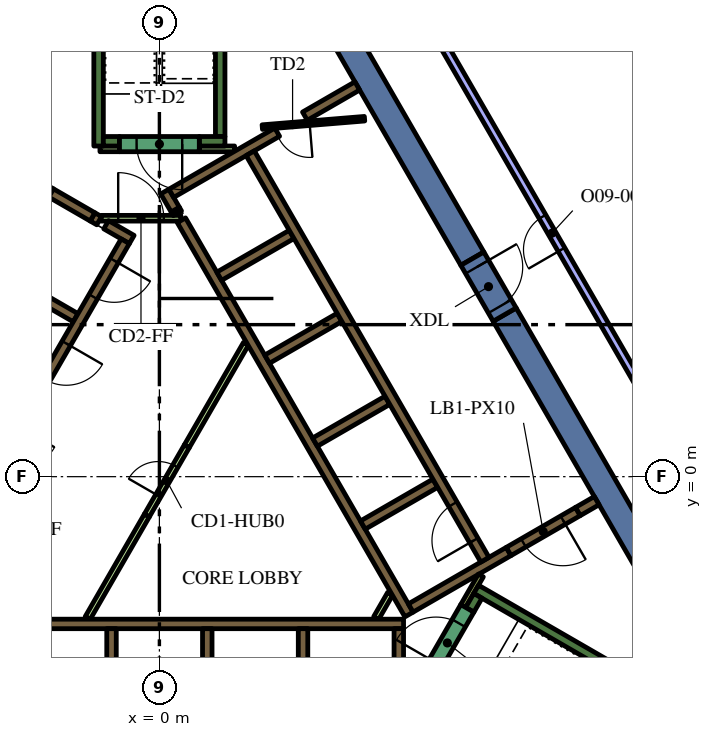
"""IFC4 building model, lengths in metres.
Left out: names, types, materials, properties, quantities, classifications, styles, units other than length and angle.
Written with IfcOpenShell. Run it as: python <this file> out.ifc"""

import sys

from ifc_helpers import new_model, si_unit, direction, frame, frame_2d, origin, place, context, subcontext, project, spatial, rectangle, extrude, element, fill, save


model = new_model("IFC4")
c1 = context("Model", 3, precision=1e-05, world=origin(), true_north=direction((0.0, 1.0)))
c2 = subcontext(c1, "Body", "Model", "MODEL_VIEW")
j1 = project(units=[si_unit("LENGTHUNIT", "METRE"), si_unit("PLANEANGLEUNIT", "RADIAN")], contexts=[c1])
p1 = place(None, origin())
s1 = spatial("IfcSite", under=j1, at=p1, CompositionType="ELEMENT")
p2 = place(p1, origin())
s2 = spatial("IfcBuilding", under=s1, at=p2, CompositionType="ELEMENT")
p3 = place(p2, frame((0.0, 0.0, 239.4)))
s3 = spatial("IfcBuildingStorey", under=s2, at=p3, CompositionType="ELEMENT", Elevation=239.4)
for number, where, z_axis, x_axis in (
    (1, (9.085, 4.264, 0.0), (0.0, 0.0, 1.0), (0.5, -0.866, 0.0)),
    (2, (8.235, 5.736, 0.0), (0.0, 0.0, 1.0), (-0.5, 0.866, 0.0)),
):
    element("IfcWall", number, at=place(p3, frame(where, z_axis=z_axis, x_axis=x_axis)), inside=s3, PredefinedType="SOLIDWALL", context=c2, shape_type="SweptSolid", body=[
        extrude(rectangle(XDim=12.472, YDim=0.7, at=frame_2d((6.236, 0.0))), origin(), (0.0, 0.0, 1.0), 4.2),
    ])
p4 = place(p3, frame((8.334, -2.964, 0.0), z_axis=(0.0, 0.0, 1.0), x_axis=(0.866016039709, -0.500016218704, 0.0)))
e3 = element("IfcWall", 3, at=p4, inside=s3, PredefinedType="SOLIDWALL", context=c2, shape_type="SweptSolid", body=[
    extrude(rectangle(XDim=7.05, YDim=0.25, at=frame_2d((3.525, 0.0))), origin(), (0.0, 0.0, 1.0), 4.2),
])
p5 = place(p3, frame((8.168, -3.503, 0.0), z_axis=(0.0, 0.0, 1.0), x_axis=(0.49972245349, 0.866185586049, 0.0)))
e4 = element("IfcWall", 4, at=p5, inside=s3, PredefinedType="SOLIDWALL", context=c2, shape_type="SweptSolid", body=[
    extrude(rectangle(XDim=0.425, YDim=0.25, at=frame_2d((0.212, 0.0))), origin(), (0.0, 0.0, 1.0), 4.2),
])
p6 = place(p3, frame((1.6, 8.95, 0.0), z_axis=(0.0, 0.0, 1.0), x_axis=(0.0, 1.0, 0.0)))
e5 = element("IfcWall", 5, at=p6, inside=s3, PredefinedType="SOLIDWALL", context=c2, shape_type="SweptSolid", body=[
    extrude(rectangle(XDim=6.8, YDim=0.25, at=frame_2d((3.4, 0.0))), origin(), (0.0, 0.0, 1.0), 4.2),
])
p7 = place(p3, frame((1.05, 8.825, 0.0), z_axis=(0.0, 0.0, 1.0), x_axis=(1.0, 0.0, 0.0)))
e6 = element("IfcWall", 6, at=p7, inside=s3, PredefinedType="SOLIDWALL", context=c2, shape_type="SweptSolid", body=[
    extrude(rectangle(XDim=0.675, YDim=0.25, at=frame_2d((0.337, 0.0))), origin(), (0.0, 0.0, 1.0), 4.2),
])
p8 = place(p3, frame((-1.6, 8.7, 0.0), z_axis=(0.0, 0.0, 1.0), x_axis=(0.0, 1.0, 0.0)))
e7 = element("IfcWall", 7, at=p8, inside=s3, PredefinedType="SOLIDWALL", context=c2, shape_type="SweptSolid", body=[
    extrude(rectangle(XDim=7.05, YDim=0.25, at=frame_2d((3.525, 0.0))), origin(), (0.0, 0.0, 1.0), 4.2),
])
p9 = place(p3, frame((-1.475, 8.825, 0.0), z_axis=(0.0, 0.0, 1.0), x_axis=(1.0, 0.0, 0.0)))
e8 = element("IfcWall", 8, at=p9, inside=s3, PredefinedType="SOLIDWALL", context=c2, shape_type="SweptSolid", body=[
    extrude(rectangle(XDim=0.425, YDim=0.25, at=frame_2d((0.212, 0.0))), origin(), (0.0, 0.0, 1.0), 4.2),
])
p10 = place(p3, frame((-5.545, -3.875, 0.0), z_axis=(0.0, 0.0, 1.0), x_axis=(1.0, 0.0, 0.0)))
e9 = element("IfcWall", 9, at=p10, inside=s3, PredefinedType="SOLIDWALL", context=c2, shape_type="SweptSolid", body=[
    extrude(rectangle(XDim=11.97, YDim=0.25, at=frame_2d((5.985, 0.0))), origin(), (0.0, 0.0, 1.0), 4.2),
])
p11 = place(p3, frame((6.3, -7.24, 0.0), z_axis=(0.0, 0.0, 1.0), x_axis=(0.0, 1.0, 0.0)))
e10 = element("IfcWall", 10, at=p11, inside=s3, PredefinedType="SOLIDWALL", context=c2, shape_type="SweptSolid", body=[
    extrude(rectangle(XDim=3.24, YDim=0.25, at=frame_2d((1.62, 0.0))), origin(), (0.0, 0.0, 1.0), 4.2),
])
for number, where, z_axis, x_axis in (
    (11, (3.78, -4.0, 0.0), (0.0, 0.0, 1.0), (0.0, -1.0, 0.0)),
    (12, (1.26, -4.0, 0.0), (0.0, 0.0, 1.0), (0.0, -1.0, 0.0)),
    (13, (-1.26, -4.0, 0.0), (0.0, 0.0, 1.0), (0.0, -1.0, 0.0)),
):
    element("IfcWall", number, at=place(p3, frame(where, z_axis=z_axis, x_axis=x_axis)), inside=s3, PredefinedType="SOLIDWALL", context=c2, shape_type="SweptSolid", body=[
        extrude(rectangle(XDim=2.2, YDim=0.25, at=frame_2d((1.1, 0.0))), origin(), (0.0, 0.0, 1.0), 4.2),
    ])
p12 = place(p3, frame((11.507, -0.631, 0.0), z_axis=(0.0, 0.0, 1.0), x_axis=(-0.866093731455, -0.499881634324, 0.0)))
e14 = element("IfcWall", 14, at=p12, inside=s3, PredefinedType="SOLIDWALL", context=c2, shape_type="SweptSolid", body=[
    extrude(rectangle(XDim=0.575, YDim=0.25, at=frame_2d((0.288, 0.0))), origin(), (0.0, 0.0, 1.0), 4.2),
])
p13 = place(p3, frame((0.473, 6.93, 0.0), z_axis=(0.0, 0.0, 1.0), x_axis=(-0.49972245349, 0.866185586049, 0.0)))
e15 = element("IfcWall", 15, at=p13, inside=s3, PredefinedType="SOLIDWALL", context=c2, shape_type="SweptSolid", body=[
    extrude(rectangle(XDim=0.11, YDim=0.25, at=frame_2d((0.055, 0.0))), origin(), (0.0, 0.0, 1.0), 4.2),
])
p14 = place(p3, frame((6.568, -3.627, 0.0), z_axis=(0.0, 0.0, 1.0), x_axis=(-0.499999455981, 0.866025717874, 0.0)))
e16 = element("IfcWall", 16, at=p14, inside=s3, PredefinedType="SOLIDWALL", context=c2, shape_type="SweptSolid", body=[
    extrude(rectangle(XDim=11.978, YDim=0.25, at=frame_2d((5.989, 0.0))), origin(), (0.0, 0.0, 1.0), 4.2),
])
p15 = place(p3, frame((0.417, 7.027, 0.0), z_axis=(0.0, 0.0, 1.0), x_axis=(-0.500210807569, 0.865903659763, 0.0)))
e17 = element("IfcWall", 17, at=p15, inside=s3, PredefinedType="SOLIDWALL", context=c2, shape_type="SweptSolid", body=[
    extrude(rectangle(XDim=0.548, YDim=0.25, at=frame_2d((0.274, 0.0))), origin(), (0.0, 0.0, 1.0), 4.2),
])
p16 = place(p3, frame((3.1, 9.064, 0.0), z_axis=(0.0, 0.0, 1.0), x_axis=(-0.866030133475, -0.499991807846, 0.0)))
e18 = element("IfcWall", 18, at=p16, inside=s3, PredefinedType="SOLIDWALL", context=c2, shape_type="SweptSolid", body=[
    extrude(rectangle(XDim=3.217, YDim=0.25, at=frame_2d((1.608, 0.0))), origin(), (0.0, 0.0, 1.0), 4.2),
])
p17 = place(p3, frame((1.574, 5.274, 0.0), z_axis=(0.0, 0.0, 1.0), x_axis=(0.866028486751, 0.499994660107, 0.0)))
e19 = element("IfcWall", 19, at=p17, inside=s3, PredefinedType="SOLIDWALL", context=c2, shape_type="SweptSolid", body=[
    extrude(rectangle(XDim=2.2, YDim=0.25, at=frame_2d((1.1, 0.0))), origin(), (0.0, 0.0, 1.0), 4.2),
])
for number, where, z_axis, x_axis in (
    (20, (2.834, 3.091, 0.0), (0.0, 0.0, 1.0), (0.866, 0.5, 0.0)),
    (21, (4.094, 0.909, 0.0), (0.0, 0.0, 1.0), (0.866, 0.5, 0.0)),
    (22, (5.354, -1.274, 0.0), (0.0, 0.0, 1.0), (0.866, 0.5, 0.0)),
):
    element("IfcWall", number, at=place(p3, frame(where, z_axis=z_axis, x_axis=x_axis)), inside=s3, PredefinedType="SOLIDWALL", context=c2, shape_type="SweptSolid", body=[
        extrude(rectangle(XDim=2.2, YDim=0.25, at=frame_2d((1.1, 0.0))), origin(), (0.0, 0.0, 1.0), 4.2),
    ])
p18 = place(p3, frame((6.614, -3.456, 0.0), z_axis=(0.0, 0.0, 1.0), x_axis=(0.866032512851, 0.499987686533, 0.0)))
e23 = element("IfcWall", 23, at=p18, inside=s3, PredefinedType="SOLIDWALL", context=c2, shape_type="SweptSolid", body=[
    extrude(rectangle(XDim=2.975, YDim=0.25, at=frame_2d((1.487, 0.0))), origin(), (0.0, 0.0, 1.0), 4.2),
])
p19 = place(p3, frame((3.83, 9.486, 0.0), z_axis=(0.0, 0.0, 1.0), x_axis=(0.865986202621, 0.500067892261, 0.0)))
e24 = element("IfcWall", 24, at=p19, inside=s3, PredefinedType="SOLIDWALL", context=c2, shape_type="SweptSolid", body=[
    extrude(rectangle(XDim=1.591, YDim=0.25, at=frame_2d((0.795, 0.0))), origin(), (0.0, 0.0, 1.0), 4.2),
])
p20 = place(p3, frame((-8.06, -1.311, 0.0), z_axis=(0.0, 0.0, 1.0), x_axis=(0.50000273126, 0.866023826885, 0.0)))
e25 = element("IfcWall", 25, at=p20, inside=s3, PredefinedType="SOLIDWALL", context=c2, shape_type="SweptSolid", body=[
    extrude(rectangle(XDim=10.33, YDim=0.25, at=frame_2d((5.165, 0.0))), origin(), (0.0, 0.0, 1.0), 4.2),
])
p21 = place(p3, frame((-1.758, 6.835, 0.0), z_axis=(0.0, 0.0, 1.0), x_axis=(0.865982457891, -0.500074377092, 0.0)))
e26 = element("IfcWall", 26, at=p21, inside=s3, PredefinedType="SOLIDWALL", context=c2, shape_type="SweptSolid", body=[
    extrude(rectangle(XDim=0.2, YDim=0.25, at=frame_2d((0.1, 0.0))), origin(), (0.0, 0.0, 1.0), 4.2),
])
p22 = place(p3, frame((-1.76, 6.836, 0.0), z_axis=(0.0, 0.0, 1.0), x_axis=(-0.865952863304, 0.500125622755, 0.0)))
e27 = element("IfcWall", 27, at=p22, inside=s3, PredefinedType="SOLIDWALL", context=c2, shape_type="SweptSolid", body=[
    extrude(rectangle(XDim=1.258, YDim=0.25, at=frame_2d((0.629, 0.0))), origin(), (0.0, 0.0, 1.0), 4.2),
])
p23 = place(p3, frame((-0.728, 6.24, 0.0), z_axis=(0.0, 0.0, 1.0), x_axis=(-0.865955664968, 0.500120771724, 0.0)))
e28 = element("IfcWall", 28, at=p23, inside=s3, PredefinedType="SOLIDWALL", context=c2, shape_type="SweptSolid", body=[
    extrude(rectangle(XDim=0.778, YDim=0.25, at=frame_2d((0.389, 0.0))), origin(), (0.0, 0.0, 1.0), 4.2),
])
p24 = place(p3, frame((-2.204, 4.182, 0.0), z_axis=(0.0, 0.0, 1.0), x_axis=(-0.866008176907, 0.50002983664, 0.0)))
e29 = element("IfcWall", 29, at=p24, inside=s3, PredefinedType="SOLIDWALL", context=c2, shape_type="SweptSolid", body=[
    extrude(rectangle(XDim=2.2, YDim=0.25, at=frame_2d((1.1, 0.0))), origin(), (0.0, 0.0, 1.0), 4.2),
])
p25 = place(p3, frame((1.05, 8.625, 0.0), z_axis=(0.0, 0.0, 1.0), x_axis=(1.0, 0.0, 0.0)))
e30 = element("IfcWall", 30, at=p25, inside=s3, PredefinedType="PARTITIONING", context=c2, shape_type="SweptSolid", body=[
    extrude(rectangle(XDim=0.929, YDim=0.15, at=frame_2d((0.464, 0.0))), origin(), (0.0, 0.0, 1.0), 3.45),
])
p26 = place(p3, frame((-1.564, 8.625, 0.0), z_axis=(0.0, 0.0, 1.0), x_axis=(1.0, 0.0, 0.0)))
e31 = element("IfcWall", 31, at=p26, inside=s3, PredefinedType="PARTITIONING", context=c2, shape_type="SweptSolid", body=[
    extrude(rectangle(XDim=0.514, YDim=0.15, at=frame_2d((0.257, 0.0))), origin(), (0.0, 0.0, 1.0), 3.45),
])
p27 = place(p3, frame((8.459, -2.599, 0.0), z_axis=(0.0, 0.0, 1.0), x_axis=(-0.500041054325, -0.866001699761, 0.0)))
e32 = element("IfcWall", 32, at=p27, inside=s3, PredefinedType="PARTITIONING", context=c2, shape_type="SweptSolid", body=[
    extrude(rectangle(XDim=0.929, YDim=0.15, at=frame_2d((0.464, 0.0))), origin(), (0.0, 0.0, 1.0), 4.2),
])
p28 = place(p3, frame((5.705, -3.718, 0.0), z_axis=(0.0, 0.0, 1.0), x_axis=(0.499962090823, 0.866047289552, 0.0)))
e33 = element("IfcWall", 33, at=p28, inside=s3, PredefinedType="PARTITIONING", context=c2, shape_type="SweptSolid", body=[
    extrude(rectangle(XDim=0.735, YDim=0.15, at=frame_2d((0.367, 0.0))), origin(), (0.0, 0.0, 1.0), 3.45),
])
p29 = place(p3, frame((-1.887, -3.718, 0.0), z_axis=(0.0, 0.0, 1.0), x_axis=(0.500043732237, 0.866000153493, 0.0)))
e34 = element("IfcWall", 34, at=p29, inside=s3, PredefinedType="PARTITIONING", context=c2, shape_type="SweptSolid", body=[
    extrude(rectangle(XDim=3.114, YDim=0.15, at=frame_2d((1.557, 0.0))), origin(), (0.0, 0.0, 1.0), 3.45),
])
p30 = place(p3, frame((0.72, 0.797, 0.0), z_axis=(0.0, 0.0, 1.0), x_axis=(0.499984921984, 0.866034108906, 0.0)))
e35 = element("IfcWall", 35, at=p30, inside=s3, PredefinedType="PARTITIONING", context=c2, shape_type="SweptSolid", body=[
    extrude(rectangle(XDim=3.113, YDim=0.15, at=frame_2d((1.557, 0.0))), origin(), (0.0, 0.0, 1.0), 3.45),
])
p31 = place(p3, frame((8.565, -2.185, 0.0), z_axis=(0.0, 0.0, 1.0), x_axis=(-0.499997954832, 0.866026584559, 0.0)))
e36 = element("IfcWall", 36, at=p31, inside=s3, PredefinedType="SOLIDWALL", context=c2, shape_type="SweptSolid", body=[
    extrude(rectangle(XDim=12.35, YDim=0.25, at=frame_2d((6.175, 0.0))), origin(), (0.0, 0.0, 1.0), 4.2),
])
p32 = place(p31, frame((0.585, 0.0, 0.0)))
e37 = element("IfcOpeningElement", 37, at=p32, cuts=e36, PredefinedType="OPENING", context=c2, shape_type="SweptSolid", body=[
    extrude(rectangle(XDim=1.1, YDim=2.1, at=frame_2d((0.55, 1.05))), frame((0.0, 0.135, 0.0), z_axis=(0.0, -1.0, 0.0), x_axis=(1.0, 0.0, 0.0)), (0.0, 0.0, 1.0), 0.27),
])
p33 = place(p3, frame((-0.898, 6.194, 0.0), z_axis=(0.0, 0.0, 1.0), x_axis=(-0.499996202215, -0.866027596426, 0.0)))
e38 = element("IfcWall", 38, at=p33, inside=s3, PredefinedType="SOLIDWALL", context=c2, shape_type="SweptSolid", body=[
    extrude(rectangle(XDim=9.83, YDim=0.25, at=frame_2d((4.915, 0.0))), origin(), (0.0, 0.0, 1.0), 4.2),
])
p34 = place(p33, frame((0.585, 0.0, 0.0)))
e39 = element("IfcOpeningElement", 39, at=p34, cuts=e38, PredefinedType="OPENING", context=c2, shape_type="SweptSolid", body=[
    extrude(rectangle(XDim=1.1, YDim=2.1, at=frame_2d((0.55, 1.05))), frame((0.0, 0.135, 0.0), z_axis=(0.0, -1.0, 0.0), x_axis=(1.0, 0.0, 0.0)), (0.0, 0.0, 1.0), 0.27),
])
p35 = place(p33, frame((3.105, 0.0, 0.0)))
e40 = element("IfcOpeningElement", 40, at=p35, cuts=e38, PredefinedType="OPENING", context=c2, shape_type="SweptSolid", body=[
    extrude(rectangle(XDim=1.1, YDim=2.1, at=frame_2d((0.55, 1.05))), frame((0.0, 0.135, 0.0), z_axis=(0.0, -1.0, 0.0), x_axis=(1.0, 0.0, 0.0)), (0.0, 0.0, 1.0), 0.27),
])
p36 = place(p33, frame((5.625, 0.0, 0.0)))
e41 = element("IfcOpeningElement", 41, at=p36, cuts=e38, PredefinedType="OPENING", context=c2, shape_type="SweptSolid", body=[
    extrude(rectangle(XDim=1.1, YDim=2.1, at=frame_2d((0.55, 1.05))), frame((0.0, 0.135, 0.0), z_axis=(0.0, -1.0, 0.0), x_axis=(1.0, 0.0, 0.0)), (0.0, 0.0, 1.0), 0.27),
])
p37 = place(p33, frame((8.145, 0.0, 0.0)))
e42 = element("IfcOpeningElement", 42, at=p37, cuts=e38, PredefinedType="OPENING", context=c2, shape_type="SweptSolid", body=[
    extrude(rectangle(XDim=1.1, YDim=2.1, at=frame_2d((0.55, 1.05))), frame((0.0, 0.135, 0.0), z_axis=(0.0, -1.0, 0.0), x_axis=(1.0, 0.0, 0.0)), (0.0, 0.0, 1.0), 0.27),
])
p38 = place(p3, frame((7.053, -5.284, 0.0), z_axis=(0.0, 0.0, 1.0), x_axis=(0.500078061341, 0.865980330357, 0.0)))
e43 = element("IfcWall", 43, at=p38, inside=s3, PredefinedType="SOLIDWALL", context=c2, shape_type="SweptSolid", body=[
    extrude(rectangle(XDim=2.1, YDim=0.4, at=frame_2d((1.05, 0.0))), origin(), (0.0, 0.0, 1.0), 4.2),
])
p39 = place(p38, frame((0.45, 0.0, 0.0)))
e44 = element("IfcOpeningElement", 44, at=p39, cuts=e43, PredefinedType="OPENING", context=c2, shape_type="SweptSolid", body=[
    extrude(rectangle(XDim=1.2, YDim=2.1, at=frame_2d((0.6, 1.05))), frame((0.0, 0.21, 0.0), z_axis=(0.0, -1.0, 0.0), x_axis=(1.0, 0.0, 0.0)), (0.0, 0.0, 1.0), 0.42),
])
p40 = place(p3, frame((1.05, 8.75, 0.0), z_axis=(0.0, 0.0, 1.0), x_axis=(-1.0, 0.0, 0.0)))
e45 = element("IfcWall", 45, at=p40, inside=s3, PredefinedType="SOLIDWALL", context=c2, shape_type="SweptSolid", body=[
    extrude(rectangle(XDim=2.1, YDim=0.4, at=frame_2d((1.05, 0.0))), origin(), (0.0, 0.0, 1.0), 4.2),
])
p41 = place(p40, frame((0.45, 0.0, 0.0)))
e46 = element("IfcOpeningElement", 46, at=p41, cuts=e45, PredefinedType="OPENING", context=c2, shape_type="SweptSolid", body=[
    extrude(rectangle(XDim=1.2, YDim=2.1, at=frame_2d((0.6, 1.05))), frame((0.0, 0.21, 0.0), z_axis=(0.0, -1.0, 0.0), x_axis=(1.0, 0.0, 0.0)), (0.0, 0.0, 1.0), 0.42),
])
p42 = place(p3, frame((5.398, 9.419, 0.0), z_axis=(0.0, 0.0, 1.0), x_axis=(-0.996653416376, -0.081743303248, 0.0)))
e47 = element("IfcWall", 47, at=p42, inside=s3, PredefinedType="PARTITIONING", context=c2, shape_type="SweptSolid", body=[
    extrude(rectangle(XDim=2.7, YDim=0.12, at=frame_2d((1.35, 0.0))), origin(), (0.0, 0.0, 1.0), 3.45),
])
p43 = place(p42, frame((1.45, 0.0, 0.0)))
e48 = element("IfcOpeningElement", 48, at=p43, cuts=e47, PredefinedType="OPENING", context=c2, shape_type="SweptSolid", body=[
    extrude(rectangle(XDim=0.9, YDim=2.1, at=frame_2d((0.45, 1.05))), frame((0.0, 0.07, 0.0), z_axis=(0.0, -1.0, 0.0), x_axis=(1.0, 0.0, 0.0)), (0.0, 0.0, 1.0), 0.14),
])
p44 = place(p3, frame((-0.33, -1.022, 0.0), z_axis=(0.0, 0.0, 1.0), x_axis=(0.500027713859, 0.866009402589, 0.0)))
e49 = element("IfcWall", 49, at=p44, inside=s3, PredefinedType="PARTITIONING", context=c2, shape_type="SweptSolid", body=[
    extrude(rectangle(XDim=2.1, YDim=0.15, at=frame_2d((1.05, 0.0))), origin(), (0.0, 0.0, 1.0), 3.45),
])
p45 = place(p44, frame((0.6, 0.0, 0.0)))
e50 = element("IfcOpeningElement", 50, at=p45, cuts=e49, PredefinedType="OPENING", context=c2, shape_type="SweptSolid", body=[
    extrude(rectangle(XDim=0.9, YDim=2.1, at=frame_2d((0.45, 1.05))), frame((0.0, 0.085, 0.0), z_axis=(0.0, -1.0, 0.0), x_axis=(1.0, 0.0, 0.0)), (0.0, 0.0, 1.0), 0.17),
])
p46 = place(p3, frame((-1.534, 6.8, 0.0), z_axis=(0.0, 0.0, 1.0), x_axis=(1.0, 0.0, 0.0)))
e51 = element("IfcWall", 51, at=p46, inside=s3, PredefinedType="PARTITIONING", context=c2, shape_type="SweptSolid", body=[
    extrude(rectangle(XDim=2.1, YDim=0.15, at=frame_2d((1.05, 0.0))), origin(), (0.0, 0.0, 1.0), 3.45),
])
p47 = place(p46, frame((0.45, 0.0, 0.0)))
e52 = element("IfcOpeningElement", 52, at=p47, cuts=e51, PredefinedType="OPENING", context=c2, shape_type="SweptSolid", body=[
    extrude(rectangle(XDim=1.2, YDim=2.1, at=frame_2d((0.6, 1.05))), frame((0.0, 0.085, 0.0), z_axis=(0.0, -1.0, 0.0), x_axis=(1.0, 0.0, 0.0)), (0.0, 0.0, 1.0), 0.17),
])
p48 = place(p3, frame((11.009, -0.919, 0.0), z_axis=(0.0, 0.0, 1.0), x_axis=(-0.866059744384, -0.49994051562, 0.0)))
e53 = element("IfcWall", 53, at=p48, inside=s3, PredefinedType="SOLIDWALL", context=c2, shape_type="SweptSolid", body=[
    extrude(rectangle(XDim=2.1, YDim=0.25, at=frame_2d((1.05, 0.0))), origin(), (0.0, 0.0, 1.0), 4.2),
])
p49 = place(p48, frame((0.45, 0.0, 0.0)))
e54 = element("IfcOpeningElement", 54, at=p49, cuts=e53, PredefinedType="OPENING", context=c2, shape_type="SweptSolid", body=[
    extrude(rectangle(XDim=1.2, YDim=2.1, at=frame_2d((0.6, 1.05))), frame((0.0, 0.135, 0.0), z_axis=(0.0, -1.0, 0.0), x_axis=(1.0, 0.0, 0.0)), (0.0, 0.0, 1.0), 0.27),
])
p50 = place(p3, frame((8.235, 5.736, 0.0), z_axis=(0.0, 0.0, 1.0), x_axis=(0.499954529098, -0.86605165483, 0.0)))
e55 = element("IfcWall", 55, at=p50, inside=s3, PredefinedType="SOLIDWALL", context=c2, shape_type="SweptSolid", body=[
    extrude(rectangle(XDim=1.7, YDim=0.7, at=frame_2d((0.85, 0.0))), origin(), (0.0, 0.0, 1.0), 4.2),
])
p51 = place(p50, frame((0.25, 0.0, 0.0)))
e56 = element("IfcOpeningElement", 56, at=p51, cuts=e55, PredefinedType="OPENING", context=c2, shape_type="SweptSolid", body=[
    extrude(rectangle(XDim=1.2, YDim=2.1, at=frame_2d((0.6, 1.05))), frame((0.0, 0.36, 0.0), z_axis=(0.0, -1.0, 0.0), x_axis=(1.0, 0.0, 0.0)), (0.0, 0.0, 1.0), 0.72),
])
p52 = place(p3, frame((13.681, 0.604, 0.0), z_axis=(0.0, 0.0, 1.0), x_axis=(-0.500001759768, 0.86602438778, 0.0)))
e57 = element("IfcWall", 57, at=p52, inside=s3, PredefinedType="PARTITIONING", context=c2, shape_type="SweptSolid", body=[
    extrude(rectangle(XDim=13.317, YDim=0.2, at=frame_2d((6.658, 0.0))), origin(), (0.0, 0.0, 1.0), 3.45),
])
p53 = place(p52, frame((6.2, 0.0, 0.0)))
e58 = element("IfcOpeningElement", 58, at=p53, cuts=e57, PredefinedType="OPENING", context=c2, shape_type="SweptSolid", body=[
    extrude(rectangle(XDim=1.0, YDim=2.1, at=frame_2d((0.5, 1.05))), frame((0.0, 0.11, 0.0), z_axis=(0.0, -1.0, 0.0), x_axis=(1.0, 0.0, 0.0)), (0.0, 0.0, 1.0), 0.22),
])
p54 = place(p32, origin())
e59 = element("IfcDoor", 59, at=p54, inside=s3, OperationType="DOUBLE_DOOR_SLIDING", PredefinedType="DOOR", context=c2, shape_type="SweptSolid", body=[
    extrude(rectangle(XDim=1.1, YDim=2.1, at=frame_2d((0.55, 1.05))), frame((0.0, 0.025, 0.0), z_axis=(0.0, -1.0, 0.0), x_axis=(1.0, 0.0, 0.0)), (0.0, 0.0, 1.0), 0.05),
])
fill(e37, e59)
p55 = place(p34, origin())
e60 = element("IfcDoor", 60, at=p55, inside=s3, OperationType="DOUBLE_DOOR_SLIDING", PredefinedType="DOOR", context=c2, shape_type="SweptSolid", body=[
    extrude(rectangle(XDim=1.1, YDim=2.1, at=frame_2d((0.55, 1.05))), frame((0.0, 0.025, 0.0), z_axis=(0.0, -1.0, 0.0), x_axis=(1.0, 0.0, 0.0)), (0.0, 0.0, 1.0), 0.05),
])
fill(e39, e60)
p56 = place(p35, origin())
e61 = element("IfcDoor", 61, at=p56, inside=s3, OperationType="DOUBLE_DOOR_SLIDING", PredefinedType="DOOR", context=c2, shape_type="SweptSolid", body=[
    extrude(rectangle(XDim=1.1, YDim=2.1, at=frame_2d((0.55, 1.05))), frame((0.0, 0.025, 0.0), z_axis=(0.0, -1.0, 0.0), x_axis=(1.0, 0.0, 0.0)), (0.0, 0.0, 1.0), 0.05),
])
fill(e40, e61)
p57 = place(p39, origin())
e62 = element("IfcDoor", 62, at=p57, inside=s3, OperationType="SINGLE_SWING_LEFT", PredefinedType="DOOR", context=c2, shape_type="SweptSolid", body=[
    extrude(rectangle(XDim=1.2, YDim=2.1, at=frame_2d((0.6, 1.05))), frame((0.0, 0.025, 0.0), z_axis=(0.0, -1.0, 0.0), x_axis=(1.0, 0.0, 0.0)), (0.0, 0.0, 1.0), 0.05),
])
fill(e44, e62)
p58 = place(p41, origin())
e63 = element("IfcDoor", 63, at=p58, inside=s3, OperationType="SINGLE_SWING_LEFT", PredefinedType="DOOR", context=c2, shape_type="SweptSolid", body=[
    extrude(rectangle(XDim=1.2, YDim=2.1, at=frame_2d((0.6, 1.05))), frame((0.0, 0.025, 0.0), z_axis=(0.0, -1.0, 0.0), x_axis=(1.0, 0.0, 0.0)), (0.0, 0.0, 1.0), 0.05),
])
fill(e46, e63)
p59 = place(p43, origin())
e64 = element("IfcDoor", 64, at=p59, inside=s3, OperationType="SINGLE_SWING_LEFT", PredefinedType="DOOR", context=c2, shape_type="SweptSolid", body=[
    extrude(rectangle(XDim=0.9, YDim=2.1, at=frame_2d((0.45, 1.05))), frame((0.0, 0.025, 0.0), z_axis=(0.0, -1.0, 0.0), x_axis=(1.0, 0.0, 0.0)), (0.0, 0.0, 1.0), 0.05),
])
fill(e48, e64)
p60 = place(p45, origin())
e65 = element("IfcDoor", 65, at=p60, inside=s3, OperationType="SINGLE_SWING_LEFT", PredefinedType="DOOR", context=c2, shape_type="SweptSolid", body=[
    extrude(rectangle(XDim=0.9, YDim=2.1, at=frame_2d((0.45, 1.05))), frame((0.0, 0.025, 0.0), z_axis=(0.0, -1.0, 0.0), x_axis=(1.0, 0.0, 0.0)), (0.0, 0.0, 1.0), 0.05),
])
fill(e50, e65)
p61 = place(p47, origin())
e66 = element("IfcDoor", 66, at=p61, inside=s3, OperationType="SINGLE_SWING_LEFT", PredefinedType="DOOR", context=c2, shape_type="SweptSolid", body=[
    extrude(rectangle(XDim=1.2, YDim=2.1, at=frame_2d((0.6, 1.05))), frame((0.0, 0.025, 0.0), z_axis=(0.0, -1.0, 0.0), x_axis=(1.0, 0.0, 0.0)), (0.0, 0.0, 1.0), 0.05),
])
fill(e52, e66)
p62 = place(p49, origin())
e67 = element("IfcDoor", 67, at=p62, inside=s3, OperationType="SINGLE_SWING_LEFT", PredefinedType="DOOR", context=c2, shape_type="SweptSolid", body=[
    extrude(rectangle(XDim=1.2, YDim=2.1, at=frame_2d((0.6, 1.05))), frame((0.0, 0.025, 0.0), z_axis=(0.0, -1.0, 0.0), x_axis=(1.0, 0.0, 0.0)), (0.0, 0.0, 1.0), 0.05),
])
fill(e54, e67)
p63 = place(p51, origin())
e68 = element("IfcDoor", 68, at=p63, inside=s3, OperationType="SINGLE_SWING_LEFT", PredefinedType="DOOR", context=c2, shape_type="SweptSolid", body=[
    extrude(rectangle(XDim=1.2, YDim=2.1, at=frame_2d((0.6, 1.05))), frame((0.0, 0.025, 0.0), z_axis=(0.0, -1.0, 0.0), x_axis=(1.0, 0.0, 0.0)), (0.0, 0.0, 1.0), 0.05),
])
fill(e56, e68)
p64 = place(p53, origin())
e69 = element("IfcDoor", 69, at=p64, inside=s3, OperationType="SINGLE_SWING_RIGHT", PredefinedType="DOOR", context=c2, shape_type="SweptSolid", body=[
    extrude(rectangle(XDim=1.0, YDim=2.1, at=frame_2d((0.5, 1.05))), frame((0.0, 0.025, 0.0), z_axis=(0.0, -1.0, 0.0), x_axis=(1.0, 0.0, 0.0)), (0.0, 0.0, 1.0), 0.05),
])
fill(e58, e69)
save(model, sys.argv[1])
